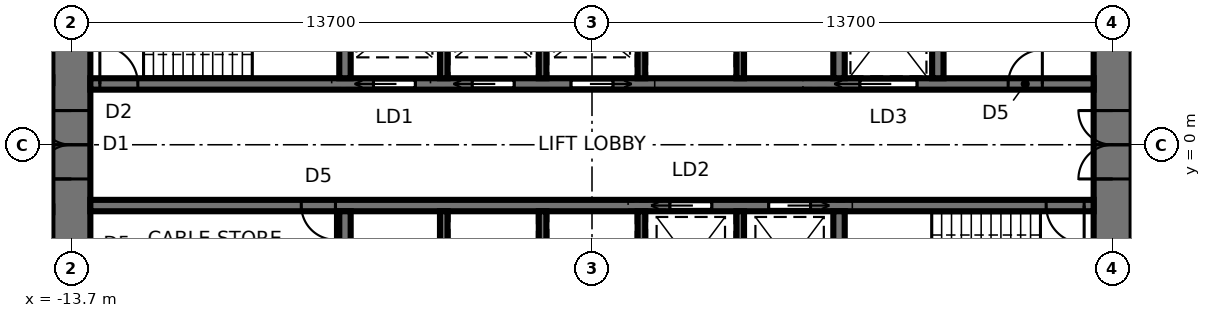
"""IFC4 building model, lengths in metres.
Left out: names, types, materials, properties, quantities, classifications, styles, units other than length and angle.
Written with IfcOpenShell. Run it as: python <this file> out.ifc"""

import sys

from ifc_helpers import new_model, si_unit, direction, frame, frame_2d, origin, place, context, subcontext, project, spatial, rectangle, extrude, element, fill, save


model = new_model("IFC4")
c1 = context("Model", 3, precision=1e-05, world=origin(), true_north=direction((0.0, 1.0)))
c2 = subcontext(c1, "Body", "Model", "MODEL_VIEW")
j1 = project(units=[si_unit("LENGTHUNIT", "METRE"), si_unit("PLANEANGLEUNIT", "RADIAN")], contexts=[c1])
p1 = place(None, origin())
s1 = spatial("IfcSite", under=j1, at=p1, CompositionType="ELEMENT")
p2 = place(p1, origin())
s2 = spatial("IfcBuilding", under=s1, at=p2, CompositionType="ELEMENT")
p3 = place(p2, frame((0.0, 0.0, 57.4)))
s3 = spatial("IfcBuildingStorey", under=s2, at=p3, CompositionType="ELEMENT", Elevation=57.4)
p4 = place(p3, frame((13.7, -9.5, 0.0), z_axis=(0.0, 0.0, 1.0), x_axis=(0.0, 1.0, 0.0)))
e1 = element("IfcWall", 1, at=p4, inside=s3, PredefinedType="SHEAR", context=c2, shape_type="SweptSolid", body=[
    extrude(rectangle(XDim=19.0, YDim=1.0, at=frame_2d((9.5, 0.0))), origin(), (0.0, 0.0, 1.0), 4.2),
])
p5 = place(p4, frame((8.6, 0.0, 0.0)))
e2 = element("IfcOpeningElement", 2, at=p5, cuts=e1, PredefinedType="OPENING", context=c2, shape_type="SweptSolid", body=[
    extrude(rectangle(XDim=1.8, YDim=2.4, at=frame_2d((0.9, 1.2))), frame((0.0, 0.51, 0.0), z_axis=(0.0, -1.0, 0.0), x_axis=(1.0, 0.0, 0.0)), (0.0, 0.0, 1.0), 1.02),
])
p6 = place(p3, frame((-13.7, 9.5, 0.0), z_axis=(0.0, 0.0, 1.0), x_axis=(0.0, -1.0, 0.0)))
e3 = element("IfcWall", 3, at=p6, inside=s3, PredefinedType="SHEAR", context=c2, shape_type="SweptSolid", body=[
    extrude(rectangle(XDim=19.0, YDim=1.0, at=frame_2d((9.5, 0.0))), origin(), (0.0, 0.0, 1.0), 4.2),
])
p7 = place(p6, frame((8.6, 0.0, 0.0)))
e4 = element("IfcOpeningElement", 4, at=p7, cuts=e3, PredefinedType="OPENING", context=c2, shape_type="SweptSolid", body=[
    extrude(rectangle(XDim=1.8, YDim=2.4, at=frame_2d((0.9, 1.2))), frame((0.0, 0.51, 0.0), z_axis=(0.0, -1.0, 0.0), x_axis=(1.0, 0.0, 0.0)), (0.0, 0.0, 1.0), 1.02),
])
p8 = place(p3, frame((-13.2, 1.6, 0.0), z_axis=(0.0, 0.0, 1.0), x_axis=(1.0, 0.0, 0.0)))
e5 = element("IfcWall", 5, at=p8, inside=s3, PredefinedType="SHEAR", context=c2, shape_type="SweptSolid", body=[
    extrude(rectangle(XDim=26.4, YDim=0.3, at=frame_2d((13.2, 0.0))), origin(), (0.0, 0.0, 1.0), 4.2),
])
p9 = place(p8, frame((0.25, 0.0, 0.0)))
e6 = element("IfcOpeningElement", 6, at=p9, cuts=e5, PredefinedType="OPENING", context=c2, shape_type="SweptSolid", body=[
    extrude(rectangle(XDim=1.0, YDim=2.1, at=frame_2d((0.5, 1.05))), frame((0.0, 0.16, 0.0), z_axis=(0.0, -1.0, 0.0), x_axis=(1.0, 0.0, 0.0)), (0.0, 0.0, 1.0), 0.32),
])
p10 = place(p8, frame((20.25, 0.0, 0.0)))
e7 = element("IfcOpeningElement", 7, at=p10, cuts=e5, PredefinedType="OPENING", context=c2, shape_type="SweptSolid", body=[
    extrude(rectangle(XDim=1.5, YDim=2.4, at=frame_2d((0.75, 1.2))), frame((0.0, 0.16, 0.0), z_axis=(0.0, -1.0, 0.0), x_axis=(1.0, 0.0, 0.0)), (0.0, 0.0, 1.0), 0.32),
])
p11 = place(p8, frame((7.45, 0.0, 0.0)))
e8 = element("IfcOpeningElement", 8, at=p11, cuts=e5, PredefinedType="OPENING", context=c2, shape_type="SweptSolid", body=[
    extrude(rectangle(XDim=1.1, YDim=2.3, at=frame_2d((0.55, 1.15))), frame((0.0, 0.16, 0.0), z_axis=(0.0, -1.0, 0.0), x_axis=(1.0, 0.0, 0.0)), (0.0, 0.0, 1.0), 0.32),
])
p12 = place(p8, frame((10.05, 0.0, 0.0)))
e9 = element("IfcOpeningElement", 9, at=p12, cuts=e5, PredefinedType="OPENING", context=c2, shape_type="SweptSolid", body=[
    extrude(rectangle(XDim=1.1, YDim=2.3, at=frame_2d((0.55, 1.15))), frame((0.0, 0.16, 0.0), z_axis=(0.0, -1.0, 0.0), x_axis=(1.0, 0.0, 0.0)), (0.0, 0.0, 1.0), 0.32),
])
p13 = place(p8, frame((12.65, 0.0, 0.0)))
e10 = element("IfcOpeningElement", 10, at=p13, cuts=e5, PredefinedType="OPENING", context=c2, shape_type="SweptSolid", body=[
    extrude(rectangle(XDim=1.1, YDim=2.3, at=frame_2d((0.55, 1.15))), frame((0.0, 0.16, 0.0), z_axis=(0.0, -1.0, 0.0), x_axis=(1.0, 0.0, 0.0)), (0.0, 0.0, 1.0), 0.32),
])
p14 = place(p8, frame((24.15, 0.0, 0.0)))
e11 = element("IfcOpeningElement", 11, at=p14, cuts=e5, PredefinedType="OPENING", context=c2, shape_type="SweptSolid", body=[
    extrude(rectangle(XDim=0.9, YDim=2.1, at=frame_2d((0.45, 1.05))), frame((0.0, 0.16, 0.0), z_axis=(0.0, -1.0, 0.0), x_axis=(1.0, 0.0, 0.0)), (0.0, 0.0, 1.0), 0.32),
])
p15 = place(p3, frame((-13.2, -1.6, 0.0), z_axis=(0.0, 0.0, 1.0), x_axis=(1.0, 0.0, 0.0)))
e12 = element("IfcWall", 12, at=p15, inside=s3, PredefinedType="SHEAR", context=c2, shape_type="SweptSolid", body=[
    extrude(rectangle(XDim=26.4, YDim=0.3, at=frame_2d((13.2, 0.0))), origin(), (0.0, 0.0, 1.0), 4.2),
])
p16 = place(p15, frame((25.15, 0.0, 0.0)))
e13 = element("IfcOpeningElement", 13, at=p16, cuts=e12, PredefinedType="OPENING", context=c2, shape_type="SweptSolid", body=[
    extrude(rectangle(XDim=1.0, YDim=2.1, at=frame_2d((0.5, 1.05))), frame((0.0, 0.16, 0.0), z_axis=(0.0, -1.0, 0.0), x_axis=(1.0, 0.0, 0.0)), (0.0, 0.0, 1.0), 0.32),
])
p17 = place(p15, frame((15.25, 0.0, 0.0)))
e14 = element("IfcOpeningElement", 14, at=p17, cuts=e12, PredefinedType="OPENING", context=c2, shape_type="SweptSolid", body=[
    extrude(rectangle(XDim=1.1, YDim=2.3, at=frame_2d((0.55, 1.15))), frame((0.0, 0.16, 0.0), z_axis=(0.0, -1.0, 0.0), x_axis=(1.0, 0.0, 0.0)), (0.0, 0.0, 1.0), 0.32),
])
p18 = place(p15, frame((17.85, 0.0, 0.0)))
e15 = element("IfcOpeningElement", 15, at=p18, cuts=e12, PredefinedType="OPENING", context=c2, shape_type="SweptSolid", body=[
    extrude(rectangle(XDim=1.1, YDim=2.3, at=frame_2d((0.55, 1.15))), frame((0.0, 0.16, 0.0), z_axis=(0.0, -1.0, 0.0), x_axis=(1.0, 0.0, 0.0)), (0.0, 0.0, 1.0), 0.32),
])
p19 = place(p15, frame((5.55, 0.0, 0.0)))
e16 = element("IfcOpeningElement", 16, at=p19, cuts=e12, PredefinedType="OPENING", context=c2, shape_type="SweptSolid", body=[
    extrude(rectangle(XDim=0.9, YDim=2.1, at=frame_2d((0.45, 1.05))), frame((0.0, 0.16, 0.0), z_axis=(0.0, -1.0, 0.0), x_axis=(1.0, 0.0, 0.0)), (0.0, 0.0, 1.0), 0.32),
])
for number, where, z_axis, x_axis in (
    (17, (-6.5, 1.75, 0.0), (0.0, 0.0, 1.0), (0.0, 1.0, 0.0)),
    (18, (6.5, 1.75, 0.0), (0.0, 0.0, 1.0), (0.0, 1.0, 0.0)),
):
    element("IfcWall", number, at=place(p3, frame(where, z_axis=z_axis, x_axis=x_axis)), inside=s3, PredefinedType="SHEAR", context=c2, shape_type="SweptSolid", body=[
        extrude(rectangle(XDim=2.7, YDim=0.3, at=frame_2d((1.35, 0.0))), origin(), (0.0, 0.0, 1.0), 4.2),
    ])
for number, where, z_axis, x_axis in (
    (19, (-3.9, 1.75, 0.0), (0.0, 0.0, 1.0), (0.0, 1.0, 0.0)),
    (20, (-1.3, 1.75, 0.0), (0.0, 0.0, 1.0), (0.0, 1.0, 0.0)),
    (21, (1.3, 1.75, 0.0), (0.0, 0.0, 1.0), (0.0, 1.0, 0.0)),
    (22, (3.9, 1.75, 0.0), (0.0, 0.0, 1.0), (0.0, 1.0, 0.0)),
):
    element("IfcWall", number, at=place(p3, frame(where, z_axis=z_axis, x_axis=x_axis)), inside=s3, PredefinedType="SHEAR", context=c2, shape_type="SweptSolid", body=[
        extrude(rectangle(XDim=2.7, YDim=0.2, at=frame_2d((1.35, 0.0))), origin(), (0.0, 0.0, 1.0), 4.2),
    ])
for number, where, z_axis, x_axis in (
    (23, (-6.5, -1.75, 0.0), (0.0, 0.0, 1.0), (0.0, -1.0, 0.0)),
    (24, (6.5, -1.75, 0.0), (0.0, 0.0, 1.0), (0.0, -1.0, 0.0)),
):
    element("IfcWall", number, at=place(p3, frame(where, z_axis=z_axis, x_axis=x_axis)), inside=s3, PredefinedType="SHEAR", context=c2, shape_type="SweptSolid", body=[
        extrude(rectangle(XDim=2.7, YDim=0.3, at=frame_2d((1.35, 0.0))), origin(), (0.0, 0.0, 1.0), 4.2),
    ])
for number, where, z_axis, x_axis in (
    (25, (-3.9, -1.75, 0.0), (0.0, 0.0, 1.0), (0.0, -1.0, 0.0)),
    (26, (-1.3, -1.75, 0.0), (0.0, 0.0, 1.0), (0.0, -1.0, 0.0)),
    (27, (1.3, -1.75, 0.0), (0.0, 0.0, 1.0), (0.0, -1.0, 0.0)),
    (28, (3.9, -1.75, 0.0), (0.0, 0.0, 1.0), (0.0, -1.0, 0.0)),
):
    element("IfcWall", number, at=place(p3, frame(where, z_axis=z_axis, x_axis=x_axis)), inside=s3, PredefinedType="SHEAR", context=c2, shape_type="SweptSolid", body=[
        extrude(rectangle(XDim=2.7, YDim=0.2, at=frame_2d((1.35, 0.0))), origin(), (0.0, 0.0, 1.0), 4.2),
    ])
p20 = place(p3, frame((9.1, 1.75, 0.0), z_axis=(0.0, 0.0, 1.0), x_axis=(0.0, 1.0, 0.0)))
e29 = element("IfcWall", 29, at=p20, inside=s3, PredefinedType="SHEAR", context=c2, shape_type="SweptSolid", body=[
    extrude(rectangle(XDim=2.7, YDim=0.3, at=frame_2d((1.35, 0.0))), origin(), (0.0, 0.0, 1.0), 4.2),
])
p21 = place(p3, frame((-18.4, -1.7, 0.0), z_axis=(0.0, 0.0, 1.0), x_axis=(1.0, 0.0, 0.0)))
e30 = element("IfcWall", 30, at=p21, inside=s3, PredefinedType="PARTITIONING", context=c2, shape_type="SweptSolid", body=[
    extrude(rectangle(XDim=4.2, YDim=0.15, at=frame_2d((2.1, 0.0))), origin(), (0.0, 0.0, 1.0), 4.04),
])
p22 = place(p7, frame((1.8, 0.0, 0.0), z_axis=(0.0, 0.0, 1.0), x_axis=(-1.0, 0.0, 0.0)))
e31 = element("IfcDoor", 31, at=p22, inside=s3, OperationType="DOUBLE_DOOR_SINGLE_SWING", PredefinedType="DOOR", context=c2, shape_type="SweptSolid", body=[
    extrude(rectangle(XDim=1.72, YDim=2.36, at=frame_2d((0.9, 1.18))), frame((0.0, 0.025, 0.0), z_axis=(0.0, -1.0, 0.0), x_axis=(1.0, 0.0, 0.0)), (0.0, 0.0, 1.0), 0.05),
    extrude(rectangle(XDim=0.04, YDim=2.4, at=frame_2d((1.78, 1.2))), frame((0.0, 0.25, 0.0), z_axis=(0.0, -1.0, 0.0), x_axis=(1.0, 0.0, 0.0)), (0.0, 0.0, 1.0), 0.5),
    extrude(rectangle(XDim=0.04, YDim=2.4, at=frame_2d((0.02, 1.2))), frame((0.0, 0.25, 0.0), z_axis=(0.0, -1.0, 0.0), x_axis=(1.0, 0.0, 0.0)), (0.0, 0.0, 1.0), 0.5),
    extrude(rectangle(XDim=1.72, YDim=0.04, at=frame_2d((0.9, 2.38))), frame((0.0, 0.25, 0.0), z_axis=(0.0, -1.0, 0.0), x_axis=(1.0, 0.0, 0.0)), (0.0, 0.0, 1.0), 0.5),
])
fill(e4, e31)
p23 = place(p5, origin())
e32 = element("IfcDoor", 32, at=p23, inside=s3, OperationType="DOUBLE_DOOR_SINGLE_SWING", PredefinedType="DOOR", context=c2, shape_type="SweptSolid", body=[
    extrude(rectangle(XDim=1.72, YDim=2.36, at=frame_2d((0.9, 1.18))), frame((0.0, 0.025, 0.0), z_axis=(0.0, -1.0, 0.0), x_axis=(1.0, 0.0, 0.0)), (0.0, 0.0, 1.0), 0.05),
    extrude(rectangle(XDim=0.04, YDim=2.4, at=frame_2d((0.02, 1.2))), frame((0.0, 0.25, 0.0), z_axis=(0.0, -1.0, 0.0), x_axis=(1.0, 0.0, 0.0)), (0.0, 0.0, 1.0), 0.5),
    extrude(rectangle(XDim=0.04, YDim=2.4, at=frame_2d((1.78, 1.2))), frame((0.0, 0.25, 0.0), z_axis=(0.0, -1.0, 0.0), x_axis=(1.0, 0.0, 0.0)), (0.0, 0.0, 1.0), 0.5),
    extrude(rectangle(XDim=1.72, YDim=0.04, at=frame_2d((0.9, 2.38))), frame((0.0, 0.25, 0.0), z_axis=(0.0, -1.0, 0.0), x_axis=(1.0, 0.0, 0.0)), (0.0, 0.0, 1.0), 0.5),
])
fill(e2, e32)
p24 = place(p9, origin())
e33 = element("IfcDoor", 33, at=p24, inside=s3, OperationType="SINGLE_SWING_LEFT", PredefinedType="DOOR", context=c2, shape_type="SweptSolid", body=[
    extrude(rectangle(XDim=1.0, YDim=2.1, at=frame_2d((0.5, 1.05))), frame((0.0, 0.025, 0.0), z_axis=(0.0, -1.0, 0.0), x_axis=(1.0, 0.0, 0.0)), (0.0, 0.0, 1.0), 0.05),
])
fill(e6, e33)
p25 = place(p16, frame((1.0, 0.0, 0.0), z_axis=(0.0, 0.0, 1.0), x_axis=(-1.0, 0.0, 0.0)))
e34 = element("IfcDoor", 34, at=p25, inside=s3, OperationType="SINGLE_SWING_LEFT", PredefinedType="DOOR", context=c2, shape_type="SweptSolid", body=[
    extrude(rectangle(XDim=1.0, YDim=2.1, at=frame_2d((0.5, 1.05))), frame((0.0, 0.025, 0.0), z_axis=(0.0, -1.0, 0.0), x_axis=(1.0, 0.0, 0.0)), (0.0, 0.0, 1.0), 0.05),
])
fill(e13, e34)
p26 = place(p10, origin())
e35 = element("IfcDoor", 35, at=p26, inside=s3, OperationType="SLIDING_TO_LEFT", PredefinedType="DOOR", context=c2, shape_type="SweptSolid", body=[
    extrude(rectangle(XDim=1.5, YDim=2.4, at=frame_2d((0.75, 1.2))), frame((0.0, 0.025, 0.0), z_axis=(0.0, -1.0, 0.0), x_axis=(1.0, 0.0, 0.0)), (0.0, 0.0, 1.0), 0.05),
])
fill(e7, e35)
p27 = place(p11, origin())
e36 = element("IfcDoor", 36, at=p27, inside=s3, OperationType="SLIDING_TO_LEFT", PredefinedType="DOOR", context=c2, shape_type="SweptSolid", body=[
    extrude(rectangle(XDim=1.1, YDim=2.3, at=frame_2d((0.55, 1.15))), frame((0.0, 0.025, 0.0), z_axis=(0.0, -1.0, 0.0), x_axis=(1.0, 0.0, 0.0)), (0.0, 0.0, 1.0), 0.05),
])
fill(e8, e36)
p28 = place(p12, origin())
e37 = element("IfcDoor", 37, at=p28, inside=s3, OperationType="SLIDING_TO_LEFT", PredefinedType="DOOR", context=c2, shape_type="SweptSolid", body=[
    extrude(rectangle(XDim=1.1, YDim=2.3, at=frame_2d((0.55, 1.15))), frame((0.0, 0.025, 0.0), z_axis=(0.0, -1.0, 0.0), x_axis=(1.0, 0.0, 0.0)), (0.0, 0.0, 1.0), 0.05),
])
fill(e9, e37)
p29 = place(p13, origin())
e38 = element("IfcDoor", 38, at=p29, inside=s3, OperationType="SLIDING_TO_RIGHT", PredefinedType="DOOR", context=c2, shape_type="SweptSolid", body=[
    extrude(rectangle(XDim=1.1, YDim=2.3, at=frame_2d((0.55, 1.15))), frame((0.0, 0.025, 0.0), z_axis=(0.0, -1.0, 0.0), x_axis=(1.0, 0.0, 0.0)), (0.0, 0.0, 1.0), 0.05),
])
fill(e10, e38)
p30 = place(p17, frame((1.1, 0.0, 0.0), z_axis=(0.0, 0.0, 1.0), x_axis=(-1.0, 0.0, 0.0)))
e39 = element("IfcDoor", 39, at=p30, inside=s3, OperationType="SLIDING_TO_RIGHT", PredefinedType="DOOR", context=c2, shape_type="SweptSolid", body=[
    extrude(rectangle(XDim=1.1, YDim=2.3, at=frame_2d((0.55, 1.15))), frame((0.0, 0.025, 0.0), z_axis=(0.0, -1.0, 0.0), x_axis=(1.0, 0.0, 0.0)), (0.0, 0.0, 1.0), 0.05),
])
fill(e14, e39)
p31 = place(p18, frame((1.1, 0.0, 0.0), z_axis=(0.0, 0.0, 1.0), x_axis=(-1.0, 0.0, 0.0)))
e40 = element("IfcDoor", 40, at=p31, inside=s3, OperationType="SLIDING_TO_LEFT", PredefinedType="DOOR", context=c2, shape_type="SweptSolid", body=[
    extrude(rectangle(XDim=1.1, YDim=2.3, at=frame_2d((0.55, 1.15))), frame((0.0, 0.025, 0.0), z_axis=(0.0, -1.0, 0.0), x_axis=(1.0, 0.0, 0.0)), (0.0, 0.0, 1.0), 0.05),
])
fill(e15, e40)
p32 = place(p14, origin())
e41 = element("IfcDoor", 41, at=p32, inside=s3, OperationType="SINGLE_SWING_RIGHT", PredefinedType="DOOR", context=c2, shape_type="SweptSolid", body=[
    extrude(rectangle(XDim=0.9, YDim=2.1, at=frame_2d((0.45, 1.05))), frame((0.0, 0.025, 0.0), z_axis=(0.0, -1.0, 0.0), x_axis=(1.0, 0.0, 0.0)), (0.0, 0.0, 1.0), 0.05),
])
fill(e11, e41)
p33 = place(p19, frame((0.9, 0.0, 0.0), z_axis=(0.0, 0.0, 1.0), x_axis=(-1.0, 0.0, 0.0)))
e42 = element("IfcDoor", 42, at=p33, inside=s3, OperationType="SINGLE_SWING_LEFT", PredefinedType="DOOR", context=c2, shape_type="SweptSolid", body=[
    extrude(rectangle(XDim=0.9, YDim=2.1, at=frame_2d((0.45, 1.05))), frame((0.0, 0.025, 0.0), z_axis=(0.0, -1.0, 0.0), x_axis=(1.0, 0.0, 0.0)), (0.0, 0.0, 1.0), 0.05),
])
fill(e16, e42)
save(model, sys.argv[1])
